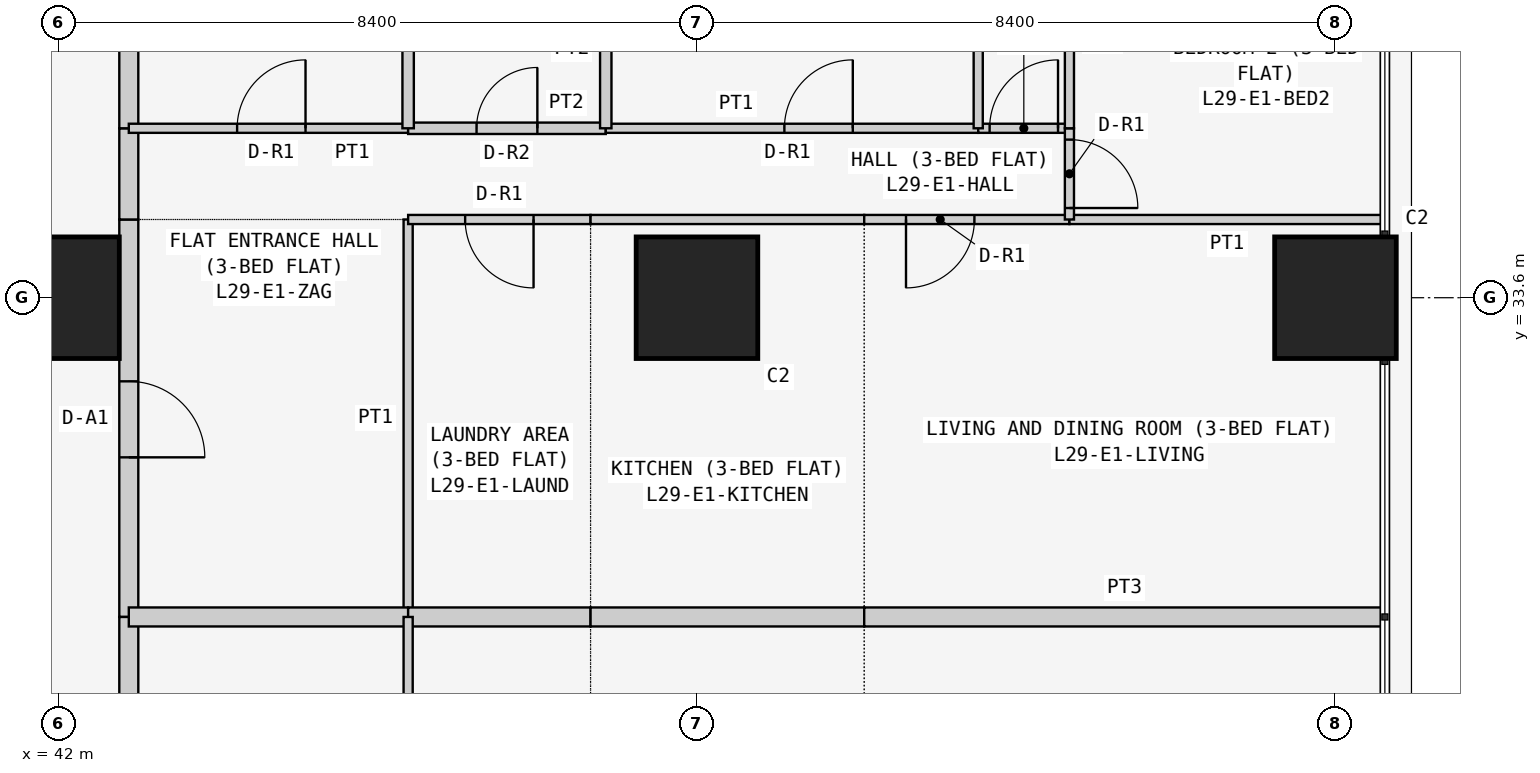
"""IFC4 building model, lengths in metres.
Left out: names, types, materials, properties, quantities, classifications, styles, units other than length and angle.
Written with IfcOpenShell. Run it as: python <this file> out.ifc"""

import sys

from ifc_helpers import new_model, si_unit, direction, frame, frame_2d, origin, origin_2d, place, context, subcontext, project, spatial, rectangle, extrude, element, fill, save


model = new_model("IFC4")
c1 = context("Model", 3, precision=1e-05, world=origin(), true_north=direction((0.0, 1.0)))
c2 = subcontext(c1, "Body", "Model", "MODEL_VIEW")
j1 = project(units=[si_unit("LENGTHUNIT", "METRE"), si_unit("PLANEANGLEUNIT", "RADIAN")], contexts=[c1])
p1 = place(None, origin())
s1 = spatial("IfcSite", under=j1, at=p1, CompositionType="ELEMENT")
p2 = place(p1, origin())
s2 = spatial("IfcBuilding", under=s1, at=p2, CompositionType="ELEMENT")
p3 = place(p2, frame((0.0, 0.0, 116.1)))
s3 = spatial("IfcBuildingStorey", under=s2, at=p3, CompositionType="ELEMENT", Elevation=116.1)
for number, where, z_axis, x_axis in (
    (1, (42.0, 33.6, 0.0), (0.0, 0.0, 1.0), (1.0, 0.0, 0.0)),
    (2, (50.4, 33.6, 0.0), (0.0, 0.0, 1.0), (1.0, 0.0, 0.0)),
    (3, (58.8, 33.6, 0.0), (0.0, 0.0, 1.0), (1.0, 0.0, 0.0)),
):
    element("IfcColumn", number, at=place(p3, frame(where, z_axis=z_axis, x_axis=x_axis)), inside=s3, PredefinedType="COLUMN", context=c2, shape_type="SweptSolid", body=[
        extrude(rectangle(XDim=1.6, YDim=1.6, at=origin_2d()), origin(), (0.0, 0.0, 1.0), 3.6),
    ])
p4 = place(p3, frame((42.925, 34.629, 0.0), z_axis=(0.0, 0.0, 1.0), x_axis=(0.0, -1.0, 0.0)))
e4 = element("IfcWall", 4, at=p4, inside=s3, PredefinedType="PARTITIONING", context=c2, shape_type="SweptSolid", body=[
    extrude(rectangle(XDim=5.229, YDim=0.25, at=frame_2d((2.615, 0.0))), origin(), (0.0, 0.0, 1.0), 3.45),
])
p5 = place(p4, frame((2.129, 0.0, 0.0)))
e5 = element("IfcOpeningElement", 5, at=p5, cuts=e4, PredefinedType="OPENING", context=c2, shape_type="SweptSolid", body=[
    extrude(rectangle(XDim=1.0, YDim=2.1, at=frame_2d((0.5, 1.05))), frame((0.0, 0.135, 0.0), z_axis=(0.0, -1.0, 0.0), x_axis=(1.0, 0.0, 0.0)), (0.0, 0.0, 1.0), 0.27),
])
p6 = place(p3, frame((42.925, 35.829, 0.0), z_axis=(0.0, 0.0, 1.0), x_axis=(0.0, -1.0, 0.0)))
e6 = element("IfcWall", 6, at=p6, inside=s3, PredefinedType="PARTITIONING", context=c2, shape_type="SweptSolid", body=[
    extrude(rectangle(XDim=1.2, YDim=0.25, at=frame_2d((0.6, 0.0))), origin(), (0.0, 0.0, 1.0), 3.45),
])
p7 = place(p3, frame((42.925, 42.7, 0.0), z_axis=(0.0, 0.0, 1.0), x_axis=(0.0, -1.0, 0.0)))
e7 = element("IfcWall", 7, at=p7, inside=s3, PredefinedType="PARTITIONING", context=c2, shape_type="SweptSolid", body=[
    extrude(rectangle(XDim=6.871, YDim=0.25, at=frame_2d((3.436, 0.0))), origin(), (0.0, 0.0, 1.0), 3.45),
])
p8 = place(p3, frame((42.925, 29.4, 0.0), z_axis=(0.0, 0.0, 1.0), x_axis=(0.0, -1.0, 0.0)))
e8 = element("IfcWall", 8, at=p8, inside=s3, PredefinedType="PARTITIONING", context=c2, shape_type="SweptSolid", body=[
    extrude(rectangle(XDim=5.229, YDim=0.25, at=frame_2d((2.615, 0.0))), origin(), (0.0, 0.0, 1.0), 3.45),
])
p9 = place(p8, frame((2.1, 0.0, 0.0)))
e9 = element("IfcOpeningElement", 9, at=p9, cuts=e8, PredefinedType="OPENING", context=c2, shape_type="SweptSolid", body=[
    extrude(rectangle(XDim=1.0, YDim=2.1, at=frame_2d((0.5, 1.05))), frame((0.0, 0.135, 0.0), z_axis=(0.0, -1.0, 0.0), x_axis=(1.0, 0.0, 0.0)), (0.0, 0.0, 1.0), 0.27),
])
p10 = place(p3, frame((46.6, 29.4, 0.0), z_axis=(0.0, 0.0, 1.0), x_axis=(0.0, 1.0, 0.0)))
e10 = element("IfcWall", 10, at=p10, inside=s3, PredefinedType="PARTITIONING", context=c2, shape_type="SweptSolid", body=[
    extrude(rectangle(XDim=5.229, YDim=0.12, at=frame_2d((2.615, 0.0))), origin(), (0.0, 0.0, 1.0), 3.45),
])
p11 = place(p3, frame((42.925, 29.4, 0.0), z_axis=(0.0, 0.0, 1.0), x_axis=(1.0, 0.0, 0.0)))
e11 = element("IfcWall", 11, at=p11, inside=s3, PredefinedType="PARTITIONING", context=c2, shape_type="SweptSolid", body=[
    extrude(rectangle(XDim=3.675, YDim=0.25, at=frame_2d((1.837, 0.0))), origin(), (0.0, 0.0, 1.0), 3.45),
])
p12 = place(p3, frame((49.0, 34.629, 0.0), z_axis=(0.0, 0.0, 1.0), x_axis=(-1.0, 0.0, 0.0)))
e12 = element("IfcWall", 12, at=p12, inside=s3, PredefinedType="PARTITIONING", context=c2, shape_type="SweptSolid", body=[
    extrude(rectangle(XDim=2.4, YDim=0.12, at=frame_2d((1.2, 0.0))), origin(), (0.0, 0.0, 1.0), 3.45),
])
p13 = place(p12, frame((0.75, 0.0, 0.0)))
e13 = element("IfcOpeningElement", 13, at=p13, cuts=e12, PredefinedType="OPENING", context=c2, shape_type="SweptSolid", body=[
    extrude(rectangle(XDim=0.9, YDim=2.1, at=frame_2d((0.45, 1.05))), frame((0.0, 0.07, 0.0), z_axis=(0.0, -1.0, 0.0), x_axis=(1.0, 0.0, 0.0)), (0.0, 0.0, 1.0), 0.14),
])
p14 = place(p3, frame((46.6, 29.4, 0.0), z_axis=(0.0, 0.0, 1.0), x_axis=(1.0, 0.0, 0.0)))
e14 = element("IfcWall", 14, at=p14, inside=s3, PredefinedType="PARTITIONING", context=c2, shape_type="SweptSolid", body=[
    extrude(rectangle(XDim=2.4, YDim=0.25, at=frame_2d((1.2, 0.0))), origin(), (0.0, 0.0, 1.0), 3.45),
])
p15 = place(p3, frame((52.6, 34.629, 0.0), z_axis=(0.0, 0.0, 1.0), x_axis=(-1.0, 0.0, 0.0)))
e15 = element("IfcWall", 15, at=p15, inside=s3, PredefinedType="PARTITIONING", context=c2, shape_type="SweptSolid", body=[
    extrude(rectangle(XDim=3.6, YDim=0.12, at=frame_2d((1.8, 0.0))), origin(), (0.0, 0.0, 1.0), 3.45),
])
p16 = place(p3, frame((49.0, 29.4, 0.0), z_axis=(0.0, 0.0, 1.0), x_axis=(1.0, 0.0, 0.0)))
e16 = element("IfcWall", 16, at=p16, inside=s3, PredefinedType="PARTITIONING", context=c2, shape_type="SweptSolid", body=[
    extrude(rectangle(XDim=3.6, YDim=0.25, at=frame_2d((1.8, 0.0))), origin(), (0.0, 0.0, 1.0), 3.45),
])
p17 = place(p3, frame((55.3, 34.629, 0.0), z_axis=(0.0, 0.0, 1.0), x_axis=(-1.0, 0.0, 0.0)))
e17 = element("IfcWall", 17, at=p17, inside=s3, PredefinedType="PARTITIONING", context=c2, shape_type="SweptSolid", body=[
    extrude(rectangle(XDim=2.7, YDim=0.12, at=frame_2d((1.35, 0.0))), origin(), (0.0, 0.0, 1.0), 3.45),
])
p18 = place(p17, frame((1.25, 0.0, 0.0)))
e18 = element("IfcOpeningElement", 18, at=p18, cuts=e17, PredefinedType="OPENING", context=c2, shape_type="SweptSolid", body=[
    extrude(rectangle(XDim=0.9, YDim=2.1, at=frame_2d((0.45, 1.05))), frame((0.0, 0.07, 0.0), z_axis=(0.0, -1.0, 0.0), x_axis=(1.0, 0.0, 0.0)), (0.0, 0.0, 1.0), 0.14),
])
p19 = place(p3, frame((59.45, 34.629, 0.0), z_axis=(0.0, 0.0, 1.0), x_axis=(-1.0, 0.0, 0.0)))
e19 = element("IfcWall", 19, at=p19, inside=s3, PredefinedType="PARTITIONING", context=c2, shape_type="SweptSolid", body=[
    extrude(rectangle(XDim=4.15, YDim=0.12, at=frame_2d((2.075, 0.0))), origin(), (0.0, 0.0, 1.0), 3.45),
])
p20 = place(p3, frame((52.6, 29.4, 0.0), z_axis=(0.0, 0.0, 1.0), x_axis=(1.0, 0.0, 0.0)))
e20 = element("IfcWall", 20, at=p20, inside=s3, PredefinedType="PARTITIONING", context=c2, shape_type="SweptSolid", body=[
    extrude(rectangle(XDim=6.85, YDim=0.25, at=frame_2d((3.425, 0.0))), origin(), (0.0, 0.0, 1.0), 3.45),
])
p21 = place(p3, frame((46.6, 35.829, 0.0), z_axis=(0.0, 0.0, 1.0), x_axis=(-1.0, 0.0, 0.0)))
e21 = element("IfcWall", 21, at=p21, inside=s3, PredefinedType="PARTITIONING", context=c2, shape_type="SweptSolid", body=[
    extrude(rectangle(XDim=3.675, YDim=0.12, at=frame_2d((1.837, 0.0))), origin(), (0.0, 0.0, 1.0), 3.45),
])
p22 = place(p21, frame((1.35, 0.0, 0.0)))
e22 = element("IfcOpeningElement", 22, at=p22, cuts=e21, PredefinedType="OPENING", context=c2, shape_type="SweptSolid", body=[
    extrude(rectangle(XDim=0.9, YDim=2.1, at=frame_2d((0.45, 1.05))), frame((0.0, 0.07, 0.0), z_axis=(0.0, -1.0, 0.0), x_axis=(1.0, 0.0, 0.0)), (0.0, 0.0, 1.0), 0.14),
])
p23 = place(p3, frame((49.2, 35.829, 0.0), z_axis=(0.0, 0.0, 1.0), x_axis=(-1.0, 0.0, 0.0)))
e23 = element("IfcWall", 23, at=p23, inside=s3, PredefinedType="PARTITIONING", context=c2, shape_type="SweptSolid", body=[
    extrude(rectangle(XDim=2.6, YDim=0.15, at=frame_2d((1.3, 0.0))), origin(), (0.0, 0.0, 1.0), 3.45),
])
p24 = place(p23, frame((0.9, 0.0, 0.0)))
e24 = element("IfcOpeningElement", 24, at=p24, cuts=e23, PredefinedType="OPENING", context=c2, shape_type="SweptSolid", body=[
    extrude(rectangle(XDim=0.8, YDim=2.1, at=frame_2d((0.4, 1.05))), frame((0.0, 0.085, 0.0), z_axis=(0.0, -1.0, 0.0), x_axis=(1.0, 0.0, 0.0)), (0.0, 0.0, 1.0), 0.17),
])
p25 = place(p3, frame((54.1, 35.829, 0.0), z_axis=(0.0, 0.0, 1.0), x_axis=(-1.0, 0.0, 0.0)))
e25 = element("IfcWall", 25, at=p25, inside=s3, PredefinedType="PARTITIONING", context=c2, shape_type="SweptSolid", body=[
    extrude(rectangle(XDim=4.9, YDim=0.12, at=frame_2d((2.45, 0.0))), origin(), (0.0, 0.0, 1.0), 3.45),
])
p26 = place(p25, frame((1.65, 0.0, 0.0)))
e26 = element("IfcOpeningElement", 26, at=p26, cuts=e25, PredefinedType="OPENING", context=c2, shape_type="SweptSolid", body=[
    extrude(rectangle(XDim=0.9, YDim=2.1, at=frame_2d((0.45, 1.05))), frame((0.0, 0.07, 0.0), z_axis=(0.0, -1.0, 0.0), x_axis=(1.0, 0.0, 0.0)), (0.0, 0.0, 1.0), 0.14),
])
p27 = place(p3, frame((55.3, 35.829, 0.0), z_axis=(0.0, 0.0, 1.0), x_axis=(-1.0, 0.0, 0.0)))
e27 = element("IfcWall", 27, at=p27, inside=s3, PredefinedType="PARTITIONING", context=c2, shape_type="SweptSolid", body=[
    extrude(rectangle(XDim=1.2, YDim=0.12, at=frame_2d((0.6, 0.0))), origin(), (0.0, 0.0, 1.0), 3.45),
])
p28 = place(p27, frame((0.15, 0.0, 0.0)))
e28 = element("IfcOpeningElement", 28, at=p28, cuts=e27, PredefinedType="OPENING", context=c2, shape_type="SweptSolid", body=[
    extrude(rectangle(XDim=0.9, YDim=2.1, at=frame_2d((0.45, 1.05))), frame((0.0, 0.07, 0.0), z_axis=(0.0, -1.0, 0.0), x_axis=(1.0, 0.0, 0.0)), (0.0, 0.0, 1.0), 0.14),
])
p29 = place(p3, frame((55.3, 34.629, 0.0), z_axis=(0.0, 0.0, 1.0), x_axis=(0.0, 1.0, 0.0)))
e29 = element("IfcWall", 29, at=p29, inside=s3, PredefinedType="PARTITIONING", context=c2, shape_type="SweptSolid", body=[
    extrude(rectangle(XDim=1.2, YDim=0.12, at=frame_2d((0.6, 0.0))), origin(), (0.0, 0.0, 1.0), 3.45),
])
p30 = place(p29, frame((0.151, 0.0, 0.0)))
e30 = element("IfcOpeningElement", 30, at=p30, cuts=e29, PredefinedType="OPENING", context=c2, shape_type="SweptSolid", body=[
    extrude(rectangle(XDim=0.9, YDim=2.1, at=frame_2d((0.45, 1.05))), frame((0.0, 0.07, 0.0), z_axis=(0.0, -1.0, 0.0), x_axis=(1.0, 0.0, 0.0)), (0.0, 0.0, 1.0), 0.14),
])
for number, where, z_axis, x_axis in (
    (31, (46.6, 35.829, 0.0), (0.0, 0.0, 1.0), (0.0, 1.0, 0.0)),
    (32, (49.2, 35.829, 0.0), (0.0, 0.0, 1.0), (0.0, 1.0, 0.0)),
):
    element("IfcWall", number, at=place(p3, frame(where, z_axis=z_axis, x_axis=x_axis)), inside=s3, PredefinedType="PARTITIONING", context=c2, shape_type="SweptSolid", body=[
        extrude(rectangle(XDim=2.971, YDim=0.15, at=frame_2d((1.485, 0.0))), origin(), (0.0, 0.0, 1.0), 3.45),
    ])
for number, where, z_axis, x_axis in (
    (33, (54.1, 35.829, 0.0), (0.0, 0.0, 1.0), (0.0, 1.0, 0.0)),
    (34, (55.3, 35.829, 0.0), (0.0, 0.0, 1.0), (0.0, 1.0, 0.0)),
):
    element("IfcWall", number, at=place(p3, frame(where, z_axis=z_axis, x_axis=x_axis)), inside=s3, PredefinedType="PARTITIONING", context=c2, shape_type="SweptSolid", body=[
        extrude(rectangle(XDim=2.285, YDim=0.12, at=frame_2d((1.143, 0.0))), origin(), (0.0, 0.0, 1.0), 3.45),
    ])
p31 = place(p3, frame((46.6, 29.4, 0.0), z_axis=(0.0, 0.0, 1.0), x_axis=(0.0, -1.0, 0.0)))
e35 = element("IfcWall", 35, at=p31, inside=s3, PredefinedType="PARTITIONING", context=c2, shape_type="SweptSolid", body=[
    extrude(rectangle(XDim=5.229, YDim=0.12, at=frame_2d((2.615, 0.0))), origin(), (0.0, 0.0, 1.0), 3.45),
])
p32 = place(p5, origin())
e36 = element("IfcDoor", 36, at=p32, inside=s3, OperationType="SINGLE_SWING_RIGHT", PredefinedType="DOOR", context=c2, shape_type="SweptSolid", body=[
    extrude(rectangle(XDim=1.0, YDim=2.1, at=frame_2d((0.5, 1.05))), frame((0.0, 0.025, 0.0), z_axis=(0.0, -1.0, 0.0), x_axis=(1.0, 0.0, 0.0)), (0.0, 0.0, 1.0), 0.05),
])
fill(e5, e36)
p33 = place(p13, origin())
e37 = element("IfcDoor", 37, at=p33, inside=s3, OperationType="SINGLE_SWING_LEFT", PredefinedType="DOOR", context=c2, shape_type="SweptSolid", body=[
    extrude(rectangle(XDim=0.9, YDim=2.1, at=frame_2d((0.45, 1.05))), frame((0.0, 0.025, 0.0), z_axis=(0.0, -1.0, 0.0), x_axis=(1.0, 0.0, 0.0)), (0.0, 0.0, 1.0), 0.05),
])
fill(e13, e37)
p34 = place(p18, origin())
e38 = element("IfcDoor", 38, at=p34, inside=s3, OperationType="SINGLE_SWING_RIGHT", PredefinedType="DOOR", context=c2, shape_type="SweptSolid", body=[
    extrude(rectangle(XDim=0.9, YDim=2.1, at=frame_2d((0.45, 1.05))), frame((0.0, 0.025, 0.0), z_axis=(0.0, -1.0, 0.0), x_axis=(1.0, 0.0, 0.0)), (0.0, 0.0, 1.0), 0.05),
])
fill(e18, e38)
p35 = place(p22, frame((0.9, 0.0, 0.0), z_axis=(0.0, 0.0, 1.0), x_axis=(-1.0, 0.0, 0.0)))
e39 = element("IfcDoor", 39, at=p35, inside=s3, OperationType="SINGLE_SWING_RIGHT", PredefinedType="DOOR", context=c2, shape_type="SweptSolid", body=[
    extrude(rectangle(XDim=0.9, YDim=2.1, at=frame_2d((0.45, 1.05))), frame((0.0, 0.025, 0.0), z_axis=(0.0, -1.0, 0.0), x_axis=(1.0, 0.0, 0.0)), (0.0, 0.0, 1.0), 0.05),
])
fill(e22, e39)
p36 = place(p24, frame((0.8, 0.0, 0.0), z_axis=(0.0, 0.0, 1.0), x_axis=(-1.0, 0.0, 0.0)))
e40 = element("IfcDoor", 40, at=p36, inside=s3, OperationType="SINGLE_SWING_RIGHT", PredefinedType="DOOR", context=c2, shape_type="SweptSolid", body=[
    extrude(rectangle(XDim=0.8, YDim=2.1, at=frame_2d((0.4, 1.05))), frame((0.0, 0.025, 0.0), z_axis=(0.0, -1.0, 0.0), x_axis=(1.0, 0.0, 0.0)), (0.0, 0.0, 1.0), 0.05),
])
fill(e24, e40)
p37 = place(p26, frame((0.9, 0.0, 0.0), z_axis=(0.0, 0.0, 1.0), x_axis=(-1.0, 0.0, 0.0)))
e41 = element("IfcDoor", 41, at=p37, inside=s3, OperationType="SINGLE_SWING_RIGHT", PredefinedType="DOOR", context=c2, shape_type="SweptSolid", body=[
    extrude(rectangle(XDim=0.9, YDim=2.1, at=frame_2d((0.45, 1.05))), frame((0.0, 0.025, 0.0), z_axis=(0.0, -1.0, 0.0), x_axis=(1.0, 0.0, 0.0)), (0.0, 0.0, 1.0), 0.05),
])
fill(e26, e41)
p38 = place(p28, frame((0.9, 0.0, 0.0), z_axis=(0.0, 0.0, 1.0), x_axis=(-1.0, 0.0, 0.0)))
e42 = element("IfcDoor", 42, at=p38, inside=s3, OperationType="SINGLE_SWING_RIGHT", PredefinedType="DOOR", context=c2, shape_type="SweptSolid", body=[
    extrude(rectangle(XDim=0.9, YDim=2.1, at=frame_2d((0.45, 1.05))), frame((0.0, 0.025, 0.0), z_axis=(0.0, -1.0, 0.0), x_axis=(1.0, 0.0, 0.0)), (0.0, 0.0, 1.0), 0.05),
])
fill(e28, e42)
p39 = place(p30, frame((0.9, 0.0, 0.0), z_axis=(0.0, 0.0, 1.0), x_axis=(-1.0, 0.0, 0.0)))
e43 = element("IfcDoor", 43, at=p39, inside=s3, OperationType="SINGLE_SWING_RIGHT", PredefinedType="DOOR", context=c2, shape_type="SweptSolid", body=[
    extrude(rectangle(XDim=0.9, YDim=2.1, at=frame_2d((0.45, 1.05))), frame((0.0, 0.025, 0.0), z_axis=(0.0, -1.0, 0.0), x_axis=(1.0, 0.0, 0.0)), (0.0, 0.0, 1.0), 0.05),
])
fill(e30, e43)
save(model, sys.argv[1])
